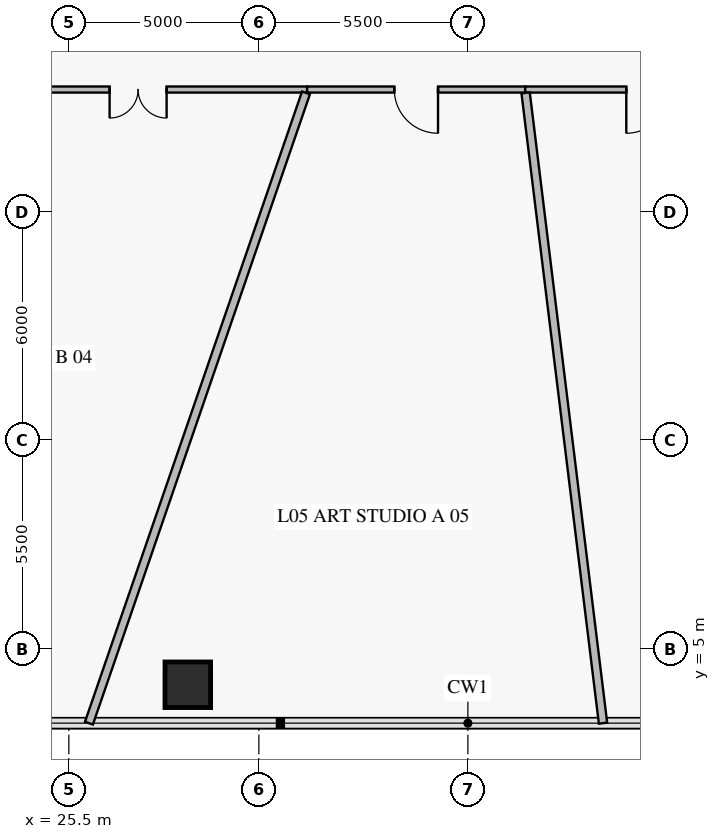
"""IFC4 building model, lengths in metres.
Left out: names, types, materials, properties, quantities, classifications, styles, units other than length and angle.
Written with IfcOpenShell. Run it as: python <this file> out.ifc"""

import sys

from ifc_helpers import new_model, si_unit, direction, frame, frame_2d, origin, origin_2d, place, context, subcontext, project, spatial, rectangle, extrude, element, fill, save


model = new_model("IFC4")
c1 = context("Model", 3, precision=1e-05, world=origin(), true_north=direction((0.0, 1.0)))
c2 = subcontext(c1, "Body", "Model", "MODEL_VIEW")
j1 = project(units=[si_unit("LENGTHUNIT", "METRE"), si_unit("PLANEANGLEUNIT", "RADIAN")], contexts=[c1])
p1 = place(None, origin())
s1 = spatial("IfcSite", under=j1, at=p1, CompositionType="ELEMENT")
p2 = place(p1, origin())
s2 = spatial("IfcBuilding", under=s1, at=p2, CompositionType="ELEMENT")
p3 = place(p2, frame((0.0, 0.0, 20.4)))
s3 = spatial("IfcBuildingStorey", under=s2, at=p3, CompositionType="ELEMENT", Elevation=20.4)
p4 = place(p3, frame((28.63, 4.052, 0.0), z_axis=(0.0, 0.0, 1.0), x_axis=(1.0, 0.0, 0.0)))
e1 = element("IfcColumn", 1, at=p4, inside=s3, PredefinedType="COLUMN", context=c2, shape_type="SweptSolid", body=[
    extrude(rectangle(XDim=1.2, YDim=1.2, at=origin_2d()), origin(), (0.0, 0.0, 1.0), 3.92),
])
p5 = place(p3, frame((22.875, 19.715, 0.0), z_axis=(0.0, 0.0, 1.0), x_axis=(1.0, 0.0, 0.0)))
e2 = element("IfcWall", 2, at=p5, inside=s3, PredefinedType="PARTITIONING", context=c2, shape_type="SweptSolid", body=[
    extrude(rectangle(XDim=8.895, YDim=0.16, at=frame_2d((4.448, 0.0))), origin(), (0.0, 0.0, 1.0), 3.22),
])
p6 = place(p5, frame((3.698, 0.0, 0.0)))
e3 = element("IfcOpeningElement", 3, at=p6, cuts=e2, PredefinedType="OPENING", context=c2, shape_type="SweptSolid", body=[
    extrude(rectangle(XDim=1.5, YDim=2.15, at=frame_2d((0.75, 1.075))), frame((0.0, 0.092, 0.0), z_axis=(0.0, -1.0, 0.0), x_axis=(1.0, 0.0, 0.0)), (0.0, 0.0, 1.0), 0.184),
])
p7 = place(p3, frame((31.77, 19.715, 0.0), z_axis=(0.0, 0.0, 1.0), x_axis=(1.0, 0.0, 0.0)))
e4 = element("IfcWall", 4, at=p7, inside=s3, PredefinedType="PARTITIONING", context=c2, shape_type="SweptSolid", body=[
    extrude(rectangle(XDim=5.738, YDim=0.16, at=frame_2d((2.869, 0.0))), origin(), (0.0, 0.0, 1.0), 3.22),
])
p8 = place(p7, frame((2.294, 0.0, 0.0)))
e5 = element("IfcOpeningElement", 5, at=p8, cuts=e4, PredefinedType="OPENING", context=c2, shape_type="SweptSolid", body=[
    extrude(rectangle(XDim=1.15, YDim=2.2, at=frame_2d((0.575, 1.1))), frame((0.0, 0.092, 0.0), z_axis=(0.0, -1.0, 0.0), x_axis=(1.0, 0.0, 0.0)), (0.0, 0.0, 1.0), 0.184),
])
p9 = place(p3, frame((37.508, 19.715, 0.0), z_axis=(0.0, 0.0, 1.0), x_axis=(1.0, 0.0, 0.0)))
e6 = element("IfcWall", 6, at=p9, inside=s3, PredefinedType="PARTITIONING", context=c2, shape_type="SweptSolid", body=[
    extrude(rectangle(XDim=6.47, YDim=0.16, at=frame_2d((3.235, 0.0))), origin(), (0.0, 0.0, 1.0), 3.22),
])
p10 = place(p9, frame((2.66, 0.0, 0.0)))
e7 = element("IfcOpeningElement", 7, at=p10, cuts=e6, PredefinedType="OPENING", context=c2, shape_type="SweptSolid", body=[
    extrude(rectangle(XDim=1.15, YDim=2.2, at=frame_2d((0.575, 1.1))), frame((0.0, 0.092, 0.0), z_axis=(0.0, -1.0, 0.0), x_axis=(1.0, 0.0, 0.0)), (0.0, 0.0, 1.0), 0.184),
])
p11 = place(p3, frame((31.74, 19.627, 0.0), z_axis=(0.0, 0.0, 1.0), x_axis=(-0.325561284918, -0.945520940943, 0.0)))
e8 = element("IfcWall", 8, at=p11, inside=s3, PredefinedType="PARTITIONING", context=c2, shape_type="SweptSolid", body=[
    extrude(rectangle(XDim=17.541, YDim=0.22, at=frame_2d((8.771, 0.0))), origin(), (0.0, 0.0, 1.0), 3.17),
])
p12 = place(p3, frame((37.519, 19.627, 0.0), z_axis=(0.0, 0.0, 1.0), x_axis=(0.121865797427, -0.992546587026, 0.0)))
e9 = element("IfcWall", 9, at=p12, inside=s3, PredefinedType="PARTITIONING", context=c2, shape_type="SweptSolid", body=[
    extrude(rectangle(XDim=16.71, YDim=0.22, at=frame_2d((8.355, 0.0))), origin(), (0.0, 0.0, 1.0), 3.17),
])
p13 = place(p6, frame((1.5, 0.0, 0.0), z_axis=(0.0, 0.0, 1.0), x_axis=(-1.0, 0.0, 0.0)))
e10 = element("IfcDoor", 10, at=p13, inside=s3, OperationType="DOUBLE_DOOR_SINGLE_SWING", PredefinedType="DOOR", context=c2, shape_type="SweptSolid", body=[
    extrude(rectangle(XDim=1.5, YDim=2.15, at=frame_2d((0.75, 1.075))), frame((0.0, 0.025, 0.0), z_axis=(0.0, -1.0, 0.0), x_axis=(1.0, 0.0, 0.0)), (0.0, 0.0, 1.0), 0.05),
])
fill(e3, e10)
p14 = place(p8, frame((1.15, 0.0, 0.0), z_axis=(0.0, 0.0, 1.0), x_axis=(-1.0, 0.0, 0.0)))
e11 = element("IfcDoor", 11, at=p14, inside=s3, OperationType="SINGLE_SWING_LEFT", PredefinedType="DOOR", context=c2, shape_type="SweptSolid", body=[
    extrude(rectangle(XDim=1.15, YDim=2.2, at=frame_2d((0.575, 1.1))), frame((0.0, 0.025, 0.0), z_axis=(0.0, -1.0, 0.0), x_axis=(1.0, 0.0, 0.0)), (0.0, 0.0, 1.0), 0.05),
])
fill(e5, e11)
p15 = place(p10, frame((1.15, 0.0, 0.0), z_axis=(0.0, 0.0, 1.0), x_axis=(-1.0, 0.0, 0.0)))
e12 = element("IfcDoor", 12, at=p15, inside=s3, OperationType="SINGLE_SWING_RIGHT", PredefinedType="DOOR", context=c2, shape_type="SweptSolid", body=[
    extrude(rectangle(XDim=1.15, YDim=2.2, at=frame_2d((0.575, 1.1))), frame((0.0, 0.025, 0.0), z_axis=(0.0, -1.0, 0.0), x_axis=(1.0, 0.0, 0.0)), (0.0, 0.0, 1.0), 0.05),
])
fill(e7, e12)
save(model, sys.argv[1])
